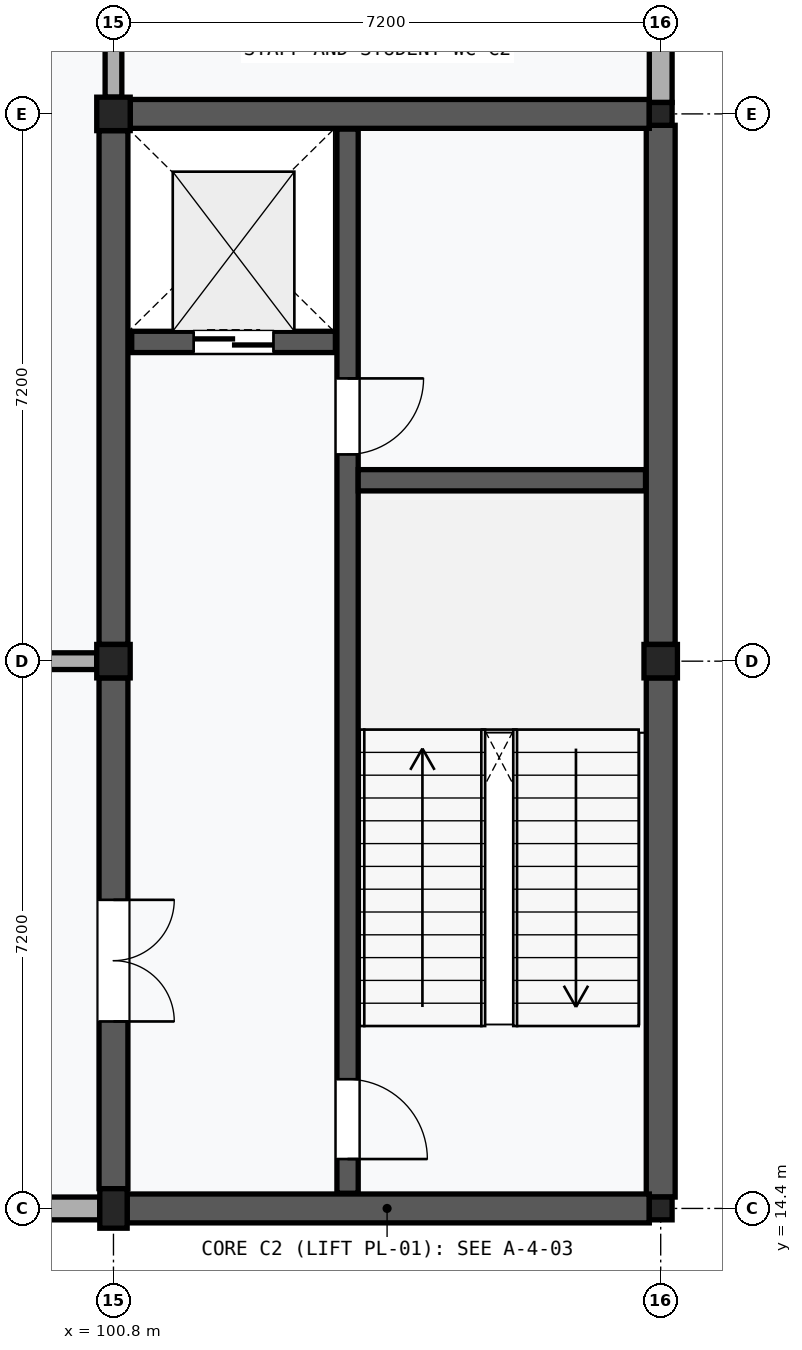
"""IFC4 building model, lengths in metres.
Left out: names, types, materials, properties, quantities, classifications, styles, units other than length and angle.
Written with IfcOpenShell. Run it as: python <this file> out.ifc"""

import sys

from ifc_helpers import new_model, si_unit, direction, frame, frame_2d, origin, origin_2d, place, context, subcontext, project, spatial, rectangle, extrude, element, fill, save


model = new_model("IFC4")
c1 = context("Model", 3, precision=1e-05, world=origin(), true_north=direction((0.0, 1.0)))
c2 = subcontext(c1, "Body", "Model", "MODEL_VIEW")
j1 = project(units=[si_unit("LENGTHUNIT", "METRE"), si_unit("PLANEANGLEUNIT", "RADIAN")], contexts=[c1])
p1 = place(None, origin())
s1 = spatial("IfcSite", under=j1, at=p1, CompositionType="ELEMENT")
p2 = place(p1, origin())
s2 = spatial("IfcBuilding", under=s1, at=p2, CompositionType="ELEMENT")
p3 = place(p2, frame((0.0, 0.0, 63.0)))
s3 = spatial("IfcBuildingStorey", under=s2, at=p3, CompositionType="ELEMENT", Elevation=63.0)
p4 = place(p3, frame((100.8, 14.4, 0.0), z_axis=(0.0, 0.0, 1.0), x_axis=(1.0, 0.0, 0.0)))
e1 = element("IfcColumn", 1, at=p4, inside=s3, PredefinedType="PILASTER", context=c2, shape_type="SweptSolid", body=[
    extrude(rectangle(XDim=0.36, YDim=0.52, at=origin_2d()), origin(), (0.0, 0.0, 1.0), 4.2),
])
for number, where, z_axis, x_axis in (
    (2, (100.8, 21.6, 0.0), (0.0, 0.0, 1.0), (1.0, 0.0, 0.0)),
    (3, (100.8, 28.8, 0.0), (0.0, 0.0, 1.0), (1.0, 0.0, 0.0)),
):
    element("IfcColumn", number, at=place(p3, frame(where, z_axis=z_axis, x_axis=x_axis)), inside=s3, PredefinedType="COLUMN", context=c2, shape_type="SweptSolid", body=[
        extrude(rectangle(XDim=0.44, YDim=0.44, at=origin_2d()), origin(), (0.0, 0.0, 1.0), 4.2),
    ])
p5 = place(p3, frame((108.0, 14.4, 0.0), z_axis=(0.0, 0.0, 1.0), x_axis=(1.0, 0.0, 0.0)))
e4 = element("IfcColumn", 4, at=p5, inside=s3, PredefinedType="COLUMN", context=c2, shape_type="SweptSolid", body=[
    extrude(rectangle(XDim=0.3, YDim=0.3, at=origin_2d()), origin(), (0.0, 0.0, 1.0), 4.2),
])
p6 = place(p3, frame((108.0, 21.6, 0.0), z_axis=(0.0, 0.0, 1.0), x_axis=(1.0, 0.0, 0.0)))
e5 = element("IfcColumn", 5, at=p6, inside=s3, PredefinedType="COLUMN", context=c2, shape_type="SweptSolid", body=[
    extrude(rectangle(XDim=0.44, YDim=0.44, at=origin_2d()), origin(), (0.0, 0.0, 1.0), 4.2),
])
p7 = place(p3, frame((108.0, 28.8, 0.0), z_axis=(0.0, 0.0, 1.0), x_axis=(1.0, 0.0, 0.0)))
e6 = element("IfcColumn", 6, at=p7, inside=s3, PredefinedType="COLUMN", context=c2, shape_type="SweptSolid", body=[
    extrude(rectangle(XDim=0.3, YDim=0.3, at=origin_2d()), origin(), (0.0, 0.0, 1.0), 4.2),
])
p8 = place(p3, frame((93.75, 14.4, 0.0), z_axis=(0.0, 0.0, 1.0), x_axis=(1.0, 0.0, 0.0)))
e7 = element("IfcWall", 7, at=p8, inside=s3, PredefinedType="SOLIDWALL", context=c2, shape_type="SweptSolid", body=[
    extrude(rectangle(XDim=6.87, YDim=0.3, at=frame_2d((3.435, 0.0))), origin(), (0.0, 0.0, 1.0), 3.39),
])
p9 = place(p8, frame((2.235, 0.0, 0.85)))
e8 = element("IfcOpeningElement", 8, at=p9, cuts=e7, PredefinedType="OPENING", context=c2, shape_type="SweptSolid", body=[
    extrude(rectangle(XDim=2.4, YDim=2.0, at=frame_2d((1.2, 1.0))), frame((0.0, 0.162, 0.0), z_axis=(0.0, -1.0, 0.0), x_axis=(1.0, 0.0, 0.0)), (0.0, 0.0, 1.0), 0.324),
])
p10 = place(p3, frame((108.0, 28.95, 0.0), z_axis=(0.0, 0.0, 1.0), x_axis=(0.0, 1.0, 0.0)))
e9 = element("IfcWall", 9, at=p10, inside=s3, PredefinedType="SOLIDWALL", context=c2, shape_type="SweptSolid", body=[
    extrude(rectangle(XDim=6.79, YDim=0.3, at=frame_2d((3.395, 0.0))), origin(), (0.0, 0.0, 1.0), 3.39),
])
p11 = place(p3, frame((100.8, 14.66, 0.0), z_axis=(0.0, 0.0, 1.0), x_axis=(0.0, 1.0, 0.0)))
e10 = element("IfcWall", 10, at=p11, inside=s3, PredefinedType="SHEAR", context=c2, shape_type="SweptSolid", body=[
    extrude(rectangle(XDim=6.72, YDim=0.38, at=frame_2d((3.36, 0.0))), origin(), (0.0, 0.0, 1.0), 3.31),
])
p12 = place(p11, frame((2.2, 0.0, 0.0)))
e11 = element("IfcOpeningElement", 11, at=p12, cuts=e10, PredefinedType="OPENING", context=c2, shape_type="SweptSolid", body=[
    extrude(rectangle(XDim=1.6, YDim=2.2, at=frame_2d((0.8, 1.1))), frame((0.0, 0.202, 0.0), z_axis=(0.0, -1.0, 0.0), x_axis=(1.0, 0.0, 0.0)), (0.0, 0.0, 1.0), 0.404),
])
p13 = place(p3, frame((100.8, 21.82, 0.0), z_axis=(0.0, 0.0, 1.0), x_axis=(0.0, 1.0, 0.0)))
e12 = element("IfcWall", 12, at=p13, inside=s3, PredefinedType="SHEAR", context=c2, shape_type="SweptSolid", body=[
    extrude(rectangle(XDim=6.76, YDim=0.38, at=frame_2d((3.38, 0.0))), origin(), (0.0, 0.0, 1.0), 3.31),
])
for number, where, z_axis, x_axis in (
    (13, (108.0, 14.55, 0.0), (0.0, 0.0, 1.0), (0.0, 1.0, 0.0)),
    (14, (108.0, 21.82, 0.0), (0.0, 0.0, 1.0), (0.0, 1.0, 0.0)),
):
    element("IfcWall", number, at=place(p3, frame(where, z_axis=z_axis, x_axis=x_axis)), inside=s3, PredefinedType="SHEAR", context=c2, shape_type="SweptSolid", body=[
        extrude(rectangle(XDim=6.83, YDim=0.38, at=frame_2d((3.415, 0.0))), origin(), (0.0, 0.0, 1.0), 3.39),
    ])
p14 = place(p3, frame((100.98, 14.4, 0.0), z_axis=(0.0, 0.0, 1.0), x_axis=(1.0, 0.0, 0.0)))
e15 = element("IfcWall", 15, at=p14, inside=s3, PredefinedType="SHEAR", context=c2, shape_type="SweptSolid", body=[
    extrude(rectangle(XDim=6.87, YDim=0.38, at=frame_2d((3.435, 0.0))), origin(), (0.0, 0.0, 1.0), 3.39),
])
p15 = place(p3, frame((101.02, 28.8, 0.0), z_axis=(0.0, 0.0, 1.0), x_axis=(1.0, 0.0, 0.0)))
e16 = element("IfcWall", 16, at=p15, inside=s3, PredefinedType="SHEAR", context=c2, shape_type="SweptSolid", body=[
    extrude(rectangle(XDim=6.83, YDim=0.38, at=frame_2d((3.415, 0.0))), origin(), (0.0, 0.0, 1.0), 3.31),
])
p16 = place(p3, frame((103.88, 14.6, 0.0), z_axis=(0.0, 0.0, 1.0), x_axis=(0.0, 1.0, 0.0)))
e17 = element("IfcWall", 17, at=p16, inside=s3, PredefinedType="SHEAR", context=c2, shape_type="SweptSolid", body=[
    extrude(rectangle(XDim=14.0, YDim=0.28, at=frame_2d((7.0, 0.0))), origin(), (0.0, 0.0, 1.0), 3.96),
])
p17 = place(p16, frame((0.45, 0.0, 0.0)))
e18 = element("IfcOpeningElement", 18, at=p17, cuts=e17, PredefinedType="OPENING", context=c2, shape_type="SweptSolid", body=[
    extrude(rectangle(XDim=1.05, YDim=2.15, at=frame_2d((0.525, 1.075))), frame((0.0, 0.152, 0.0), z_axis=(0.0, -1.0, 0.0), x_axis=(1.0, 0.0, 0.0)), (0.0, 0.0, 1.0), 0.304),
])
p18 = place(p16, frame((9.72, 0.0, 0.0)))
e19 = element("IfcOpeningElement", 19, at=p18, cuts=e17, PredefinedType="OPENING", context=c2, shape_type="SweptSolid", body=[
    extrude(rectangle(XDim=1.0, YDim=2.15, at=frame_2d((0.5, 1.075))), frame((0.0, 0.152, 0.0), z_axis=(0.0, -1.0, 0.0), x_axis=(1.0, 0.0, 0.0)), (0.0, 0.0, 1.0), 0.304),
])
p19 = place(p3, frame((104.02, 23.98, 0.0), z_axis=(0.0, 0.0, 1.0), x_axis=(1.0, 0.0, 0.0)))
e20 = element("IfcWall", 20, at=p19, inside=s3, PredefinedType="SHEAR", context=c2, shape_type="SweptSolid", body=[
    extrude(rectangle(XDim=3.78, YDim=0.28, at=frame_2d((1.89, 0.0))), origin(), (0.0, 0.0, 1.0), 3.96),
])
p20 = place(p3, frame((101.04, 25.8, 0.0), z_axis=(0.0, 0.0, 1.0), x_axis=(1.0, 0.0, 0.0)))
e21 = element("IfcWall", 21, at=p20, inside=s3, PredefinedType="SHEAR", context=c2, shape_type="SweptSolid", body=[
    extrude(rectangle(XDim=2.68, YDim=0.28, at=frame_2d((1.34, 0.0))), origin(), (0.0, 0.0, 1.0), 3.96),
])
p21 = place(p20, frame((0.815, 0.0, 0.0)))
e22 = element("IfcOpeningElement", 22, at=p21, cuts=e21, PredefinedType="OPENING", context=c2, shape_type="SweptSolid", body=[
    extrude(rectangle(XDim=1.05, YDim=2.2, at=frame_2d((0.525, 1.1))), frame((0.0, 0.152, 0.0), z_axis=(0.0, -1.0, 0.0), x_axis=(1.0, 0.0, 0.0)), (0.0, 0.0, 1.0), 0.304),
])
p22 = place(p3, frame((93.82, 21.6, 0.0), z_axis=(0.0, 0.0, 1.0), x_axis=(1.0, 0.0, 0.0)))
e23 = element("IfcWall", 23, at=p22, inside=s3, PredefinedType="PARTITIONING", context=c2, shape_type="SweptSolid", body=[
    extrude(rectangle(XDim=6.76, YDim=0.22, at=frame_2d((3.38, 0.0))), origin(), (0.0, 0.0, 1.0), 3.31),
])
p23 = place(p22, frame((2.78, 0.0, 0.0)))
e24 = element("IfcOpeningElement", 24, at=p23, cuts=e23, PredefinedType="OPENING", context=c2, shape_type="SweptSolid", body=[
    extrude(rectangle(XDim=1.2, YDim=2.24, at=frame_2d((0.6, 1.12))), frame((0.0, 0.122, 0.0), z_axis=(0.0, -1.0, 0.0), x_axis=(1.0, 0.0, 0.0)), (0.0, 0.0, 1.0), 0.244),
])
p24 = place(p3, frame((100.8, 29.02, 0.0), z_axis=(0.0, 0.0, 1.0), x_axis=(0.0, 1.0, 0.0)))
e25 = element("IfcWall", 25, at=p24, inside=s3, PredefinedType="PARTITIONING", context=c2, shape_type="SweptSolid", body=[
    extrude(rectangle(XDim=6.76, YDim=0.22, at=frame_2d((3.38, 0.0))), origin(), (0.0, 0.0, 1.0), 3.31),
])
p25 = place(p12, frame((1.6, 0.0, 0.0), z_axis=(0.0, 0.0, 1.0), x_axis=(-1.0, 0.0, 0.0)))
e26 = element("IfcDoor", 26, at=p25, inside=s3, OperationType="DOUBLE_DOOR_SINGLE_SWING", PredefinedType="DOOR", context=c2, shape_type="SweptSolid", body=[
    extrude(rectangle(XDim=1.6, YDim=2.2, at=frame_2d((0.8, 1.1))), frame((0.0, 0.025, 0.0), z_axis=(0.0, -1.0, 0.0), x_axis=(1.0, 0.0, 0.0)), (0.0, 0.0, 1.0), 0.05),
])
fill(e11, e26)
p26 = place(p17, frame((1.05, 0.0, 0.0), z_axis=(0.0, 0.0, 1.0), x_axis=(-1.0, 0.0, 0.0)))
e27 = element("IfcDoor", 27, at=p26, inside=s3, OperationType="SINGLE_SWING_RIGHT", PredefinedType="DOOR", context=c2, shape_type="SweptSolid", body=[
    extrude(rectangle(XDim=1.05, YDim=2.15, at=frame_2d((0.525, 1.075))), frame((0.0, 0.025, 0.0), z_axis=(0.0, -1.0, 0.0), x_axis=(1.0, 0.0, 0.0)), (0.0, 0.0, 1.0), 0.05),
])
fill(e18, e27)
p27 = place(p18, frame((1.0, 0.0, 0.0), z_axis=(0.0, 0.0, 1.0), x_axis=(-1.0, 0.0, 0.0)))
e28 = element("IfcDoor", 28, at=p27, inside=s3, OperationType="SINGLE_SWING_LEFT", PredefinedType="DOOR", context=c2, shape_type="SweptSolid", body=[
    extrude(rectangle(XDim=1.0, YDim=2.15, at=frame_2d((0.5, 1.075))), frame((0.0, 0.025, 0.0), z_axis=(0.0, -1.0, 0.0), x_axis=(1.0, 0.0, 0.0)), (0.0, 0.0, 1.0), 0.05),
])
fill(e19, e28)
p28 = place(p21, frame((1.05, 0.0, 0.0), z_axis=(0.0, 0.0, 1.0), x_axis=(-1.0, 0.0, 0.0)))
e29 = element("IfcDoor", 29, at=p28, inside=s3, OperationType="DOUBLE_DOOR_SLIDING", PredefinedType="DOOR", context=c2, shape_type="SweptSolid", body=[
    extrude(rectangle(XDim=1.05, YDim=2.2, at=frame_2d((0.525, 1.1))), frame((0.0, 0.025, 0.0), z_axis=(0.0, -1.0, 0.0), x_axis=(1.0, 0.0, 0.0)), (0.0, 0.0, 1.0), 0.05),
])
fill(e22, e29)
save(model, sys.argv[1])
